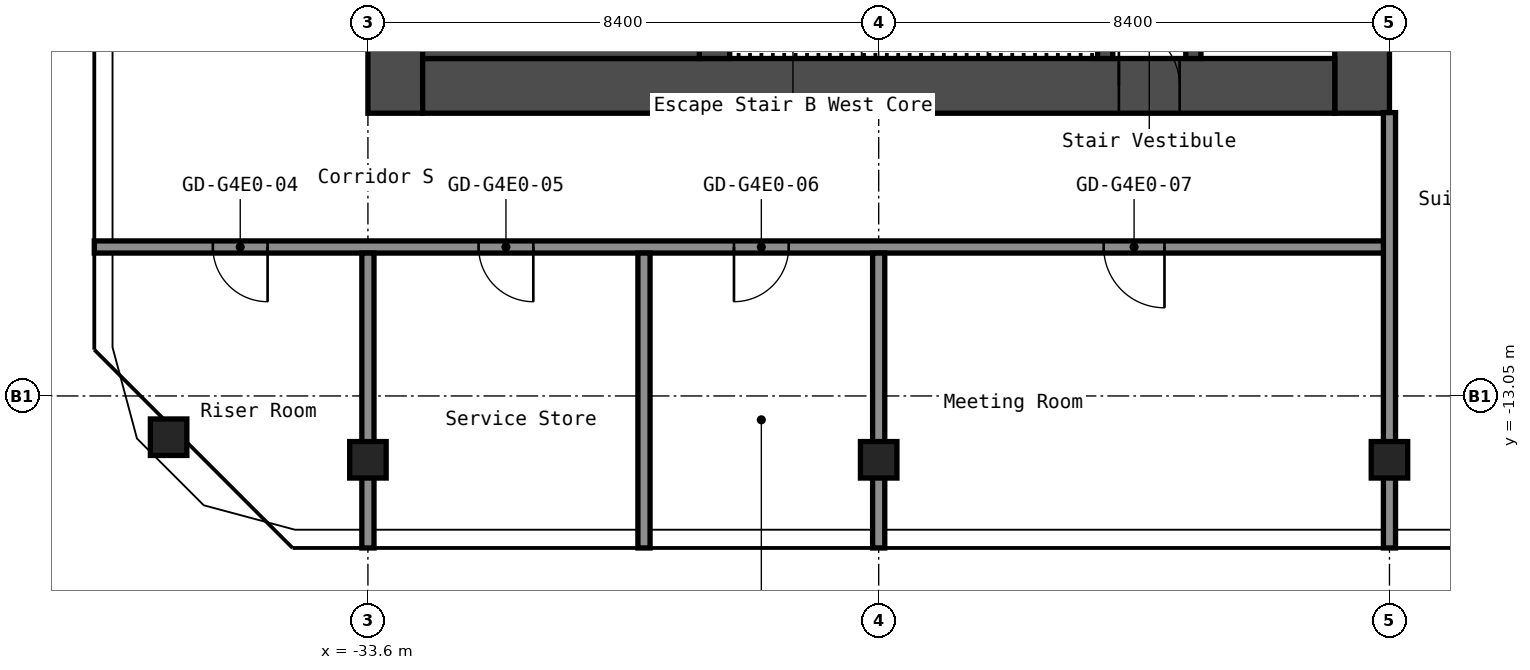
"""IFC4 building model, lengths in metres.
Left out: names, types, materials, properties, quantities, classifications, styles, units other than length and angle.
Written with IfcOpenShell. Run it as: python <this file> out.ifc"""

import sys

from ifc_helpers import new_model, si_unit, direction, frame, frame_2d, origin, origin_2d, place, context, subcontext, project, spatial, rectangle, hollow_rectangle, extrude, element, fill, save


model = new_model("IFC4")
c1 = context("Model", 3, precision=1e-05, world=origin(), true_north=direction((0.0, 1.0)))
c2 = subcontext(c1, "Body", "Model", "MODEL_VIEW")
j1 = project(units=[si_unit("LENGTHUNIT", "METRE"), si_unit("PLANEANGLEUNIT", "RADIAN")], contexts=[c1])
p1 = place(None, origin())
s1 = spatial("IfcSite", under=j1, at=p1, CompositionType="ELEMENT")
p2 = place(p1, origin())
s2 = spatial("IfcBuilding", under=s1, at=p2, CompositionType="ELEMENT")
p3 = place(p2, frame((0.0, 0.0, 199.4)))
s3 = spatial("IfcBuildingStorey", under=s2, at=p3, CompositionType="ELEMENT", Elevation=199.4)
for number, where, z_axis, x_axis in (
    (1, (-36.878, -13.729, 0.0), (0.0, 0.0, 1.0), (1.0, 0.0, 0.0)),
    (2, (-33.6, -14.1, 0.0), (0.0, 0.0, 1.0), (1.0, 0.0, 0.0)),
    (3, (-25.2, -14.1, 0.0), (0.0, 0.0, 1.0), (1.0, 0.0, 0.0)),
    (4, (-16.8, -14.1, 0.0), (0.0, 0.0, 1.0), (1.0, 0.0, 0.0)),
):
    element("IfcColumn", number, at=place(p3, frame(where, z_axis=z_axis, x_axis=x_axis)), inside=s3, PredefinedType="COLUMN", context=c2, shape_type="SweptSolid", body=[
        extrude(hollow_rectangle(XDim=0.6, YDim=0.6, WallThickness=0.025, InnerFilletRadius=0.038, OuterFilletRadius=0.062, at=origin_2d()), origin(), (0.0, 0.0, 1.0), 2.75),
    ])
p4 = place(p3, frame((-17.25, -8.4, 0.0), z_axis=(0.0, 0.0, 1.0), x_axis=(0.0, 1.0, 0.0)))
e5 = element("IfcWall", 5, at=p4, inside=s3, PredefinedType="SHEAR", context=c2, shape_type="SweptSolid", body=[
    extrude(rectangle(XDim=16.8, YDim=0.9, at=frame_2d((8.4, 0.0))), origin(), (0.0, 0.0, 1.0), 2.75),
])
p5 = place(p4, frame((10.1, 0.0, 0.0)))
e6 = element("IfcOpeningElement", 6, at=p5, cuts=e5, PredefinedType="OPENING", context=c2, shape_type="SweptSolid", body=[
    extrude(rectangle(XDim=1.6, YDim=2.1, at=frame_2d((0.8, 1.05))), frame((0.0, 0.46, 0.0), z_axis=(0.0, -1.0, 0.0), x_axis=(1.0, 0.0, 0.0)), (0.0, 0.0, 1.0), 0.92),
])
p6 = place(p3, frame((-33.15, -8.4, 0.0), z_axis=(0.0, 0.0, 1.0), x_axis=(0.0, 1.0, 0.0)))
e7 = element("IfcWall", 7, at=p6, inside=s3, PredefinedType="SHEAR", context=c2, shape_type="SweptSolid", body=[
    extrude(rectangle(XDim=16.8, YDim=0.9, at=frame_2d((8.4, 0.0))), origin(), (0.0, 0.0, 1.0), 2.75),
])
p7 = place(p3, frame((-32.7, -7.95, 0.0), z_axis=(0.0, 0.0, 1.0), x_axis=(1.0, 0.0, 0.0)))
e8 = element("IfcWall", 8, at=p7, inside=s3, PredefinedType="SHEAR", context=c2, shape_type="SweptSolid", body=[
    extrude(rectangle(XDim=15.0, YDim=0.9, at=frame_2d((7.5, 0.0))), origin(), (0.0, 0.0, 1.0), 2.75),
])
p8 = place(p7, frame((11.45, 0.0, 0.0)))
e9 = element("IfcOpeningElement", 9, at=p8, cuts=e8, PredefinedType="OPENING", context=c2, shape_type="SweptSolid", body=[
    extrude(rectangle(XDim=1.0, YDim=2.1, at=frame_2d((0.5, 1.05))), frame((0.0, 0.46, 0.0), z_axis=(0.0, -1.0, 0.0), x_axis=(1.0, 0.0, 0.0)), (0.0, 0.0, 1.0), 0.92),
])
p9 = place(p3, frame((-20.025, -7.5, 0.0), z_axis=(0.0, 0.0, 1.0), x_axis=(0.0, 1.0, 0.0)))
e10 = element("IfcWall", 10, at=p9, inside=s3, PredefinedType="SHEAR", context=c2, shape_type="SweptSolid", body=[
    extrude(rectangle(XDim=6.3, YDim=0.25, at=frame_2d((3.15, 0.0))), origin(), (0.0, 0.0, 1.0), 2.75),
])
p10 = place(p9, frame((2.4, 0.0, 0.0)))
e11 = element("IfcOpeningElement", 11, at=p10, cuts=e10, PredefinedType="OPENING", context=c2, shape_type="SweptSolid", body=[
    extrude(rectangle(XDim=1.0, YDim=2.1, at=frame_2d((0.5, 1.05))), frame((0.0, 0.135, 0.0), z_axis=(0.0, -1.0, 0.0), x_axis=(1.0, 0.0, 0.0)), (0.0, 0.0, 1.0), 0.27),
])
p11 = place(p3, frame((-21.475, -7.5, 0.0), z_axis=(0.0, 0.0, 1.0), x_axis=(0.0, 1.0, 0.0)))
e12 = element("IfcWall", 12, at=p11, inside=s3, PredefinedType="SHEAR", context=c2, shape_type="SweptSolid", body=[
    extrude(rectangle(XDim=3.75, YDim=0.25, at=frame_2d((1.875, 0.0))), origin(), (0.0, 0.0, 1.0), 2.75),
])
p12 = place(p11, frame((1.3, 0.0, 0.0)))
e13 = element("IfcOpeningElement", 13, at=p12, cuts=e12, PredefinedType="OPENING", context=c2, shape_type="SweptSolid", body=[
    extrude(rectangle(XDim=1.2, YDim=2.1, at=frame_2d((0.6, 1.05))), frame((0.0, 0.135, 0.0), z_axis=(0.0, -1.0, 0.0), x_axis=(1.0, 0.0, 0.0)), (0.0, 0.0, 1.0), 0.27),
])
p13 = place(p3, frame((-27.9, -7.5, 0.0), z_axis=(0.0, 0.0, 1.0), x_axis=(0.0, 1.0, 0.0)))
e14 = element("IfcWall", 14, at=p13, inside=s3, PredefinedType="SHEAR", context=c2, shape_type="SweptSolid", body=[
    extrude(rectangle(XDim=3.75, YDim=0.5, at=frame_2d((1.875, 0.0))), origin(), (0.0, 0.0, 1.0), 2.75),
])
p14 = place(p3, frame((-32.7, -6.75, 0.0), z_axis=(0.0, 0.0, 1.0), x_axis=(1.0, 0.0, 0.0)))
e15 = element("IfcWall", 15, at=p14, inside=s3, PredefinedType="SHEAR", context=c2, shape_type="SweptSolid", body=[
    extrude(rectangle(XDim=4.55, YDim=1.5, at=frame_2d((2.275, 0.0))), origin(), (0.0, 0.0, 1.0), 2.75),
])
p15 = place(p3, frame((-38.1, -10.6, 0.0), z_axis=(0.0, 0.0, 1.0), x_axis=(1.0, 0.0, 0.0)))
e16 = element("IfcWall", 16, at=p15, inside=s3, PredefinedType="PARTITIONING", context=c2, shape_type="SweptSolid", body=[
    extrude(rectangle(XDim=21.3, YDim=0.2, at=frame_2d((10.65, 0.0))), origin(), (0.0, 0.0, 1.0), 2.75),
])
p16 = place(p15, frame((1.95, 0.0, 0.0)))
e17 = element("IfcOpeningElement", 17, at=p16, cuts=e16, PredefinedType="OPENING", context=c2, shape_type="SweptSolid", body=[
    extrude(rectangle(XDim=0.9, YDim=2.1, at=frame_2d((0.45, 1.05))), frame((0.0, 0.11, 0.0), z_axis=(0.0, -1.0, 0.0), x_axis=(1.0, 0.0, 0.0)), (0.0, 0.0, 1.0), 0.22),
])
p17 = place(p15, frame((6.32, 0.0, 0.0)))
e18 = element("IfcOpeningElement", 18, at=p17, cuts=e16, PredefinedType="OPENING", context=c2, shape_type="SweptSolid", body=[
    extrude(rectangle(XDim=0.9, YDim=2.1, at=frame_2d((0.45, 1.05))), frame((0.0, 0.11, 0.0), z_axis=(0.0, -1.0, 0.0), x_axis=(1.0, 0.0, 0.0)), (0.0, 0.0, 1.0), 0.22),
])
p18 = place(p15, frame((10.52, 0.0, 0.0)))
e19 = element("IfcOpeningElement", 19, at=p18, cuts=e16, PredefinedType="OPENING", context=c2, shape_type="SweptSolid", body=[
    extrude(rectangle(XDim=0.9, YDim=2.1, at=frame_2d((0.45, 1.05))), frame((0.0, 0.11, 0.0), z_axis=(0.0, -1.0, 0.0), x_axis=(1.0, 0.0, 0.0)), (0.0, 0.0, 1.0), 0.22),
])
p19 = place(p15, frame((16.6, 0.0, 0.0)))
e20 = element("IfcOpeningElement", 20, at=p19, cuts=e16, PredefinedType="OPENING", context=c2, shape_type="SweptSolid", body=[
    extrude(rectangle(XDim=1.0, YDim=2.1, at=frame_2d((0.5, 1.05))), frame((0.0, 0.11, 0.0), z_axis=(0.0, -1.0, 0.0), x_axis=(1.0, 0.0, 0.0)), (0.0, 0.0, 1.0), 0.22),
])
for number, where, z_axis, x_axis in (
    (21, (-33.6, -15.55, 0.0), (0.0, 0.0, 1.0), (0.0, 1.0, 0.0)),
    (22, (-29.06, -15.55, 0.0), (0.0, 0.0, 1.0), (0.0, 1.0, 0.0)),
    (23, (-25.2, -15.55, 0.0), (0.0, 0.0, 1.0), (0.0, 1.0, 0.0)),
):
    element("IfcWall", number, at=place(p3, frame(where, z_axis=z_axis, x_axis=x_axis)), inside=s3, PredefinedType="PARTITIONING", context=c2, shape_type="SweptSolid", body=[
        extrude(rectangle(XDim=4.85, YDim=0.2, at=frame_2d((2.425, 0.0))), origin(), (0.0, 0.0, 1.0), 2.75),
    ])
p20 = place(p3, frame((-16.8, -15.55, 0.0), z_axis=(0.0, 0.0, 1.0), x_axis=(0.0, 1.0, 0.0)))
e24 = element("IfcWall", 24, at=p20, inside=s3, PredefinedType="PARTITIONING", context=c2, shape_type="SweptSolid", body=[
    extrude(rectangle(XDim=7.16, YDim=0.2, at=frame_2d((3.58, 0.0))), origin(), (0.0, 0.0, 1.0), 2.75),
])
p21 = place(p8, origin())
e25 = element("IfcDoor", 25, at=p21, inside=s3, OperationType="SINGLE_SWING_RIGHT", PredefinedType="DOOR", context=c2, shape_type="SweptSolid", body=[
    extrude(rectangle(XDim=1.0, YDim=2.1, at=frame_2d((0.5, 1.05))), frame((0.0, 0.025, 0.0), z_axis=(0.0, -1.0, 0.0), x_axis=(1.0, 0.0, 0.0)), (0.0, 0.0, 1.0), 0.05),
])
fill(e9, e25)
p22 = place(p16, origin())
e26 = element("IfcDoor", 26, at=p22, inside=s3, OperationType="SINGLE_SWING_RIGHT", PredefinedType="DOOR", context=c2, shape_type="SweptSolid", body=[
    extrude(rectangle(XDim=0.9, YDim=2.1, at=frame_2d((0.45, 1.05))), frame((0.0, 0.025, 0.0), z_axis=(0.0, -1.0, 0.0), x_axis=(1.0, 0.0, 0.0)), (0.0, 0.0, 1.0), 0.05),
])
fill(e17, e26)
p23 = place(p17, origin())
e27 = element("IfcDoor", 27, at=p23, inside=s3, OperationType="SINGLE_SWING_RIGHT", PredefinedType="DOOR", context=c2, shape_type="SweptSolid", body=[
    extrude(rectangle(XDim=0.9, YDim=2.1, at=frame_2d((0.45, 1.05))), frame((0.0, 0.025, 0.0), z_axis=(0.0, -1.0, 0.0), x_axis=(1.0, 0.0, 0.0)), (0.0, 0.0, 1.0), 0.05),
])
fill(e18, e27)
p24 = place(p18, origin())
e28 = element("IfcDoor", 28, at=p24, inside=s3, OperationType="SINGLE_SWING_LEFT", PredefinedType="DOOR", context=c2, shape_type="SweptSolid", body=[
    extrude(rectangle(XDim=0.9, YDim=2.1, at=frame_2d((0.45, 1.05))), frame((0.0, 0.025, 0.0), z_axis=(0.0, -1.0, 0.0), x_axis=(1.0, 0.0, 0.0)), (0.0, 0.0, 1.0), 0.05),
])
fill(e19, e28)
p25 = place(p19, origin())
e29 = element("IfcDoor", 29, at=p25, inside=s3, OperationType="SINGLE_SWING_RIGHT", PredefinedType="DOOR", context=c2, shape_type="SweptSolid", body=[
    extrude(rectangle(XDim=1.0, YDim=2.1, at=frame_2d((0.5, 1.05))), frame((0.0, 0.025, 0.0), z_axis=(0.0, -1.0, 0.0), x_axis=(1.0, 0.0, 0.0)), (0.0, 0.0, 1.0), 0.05),
])
fill(e20, e29)
save(model, sys.argv[1])
